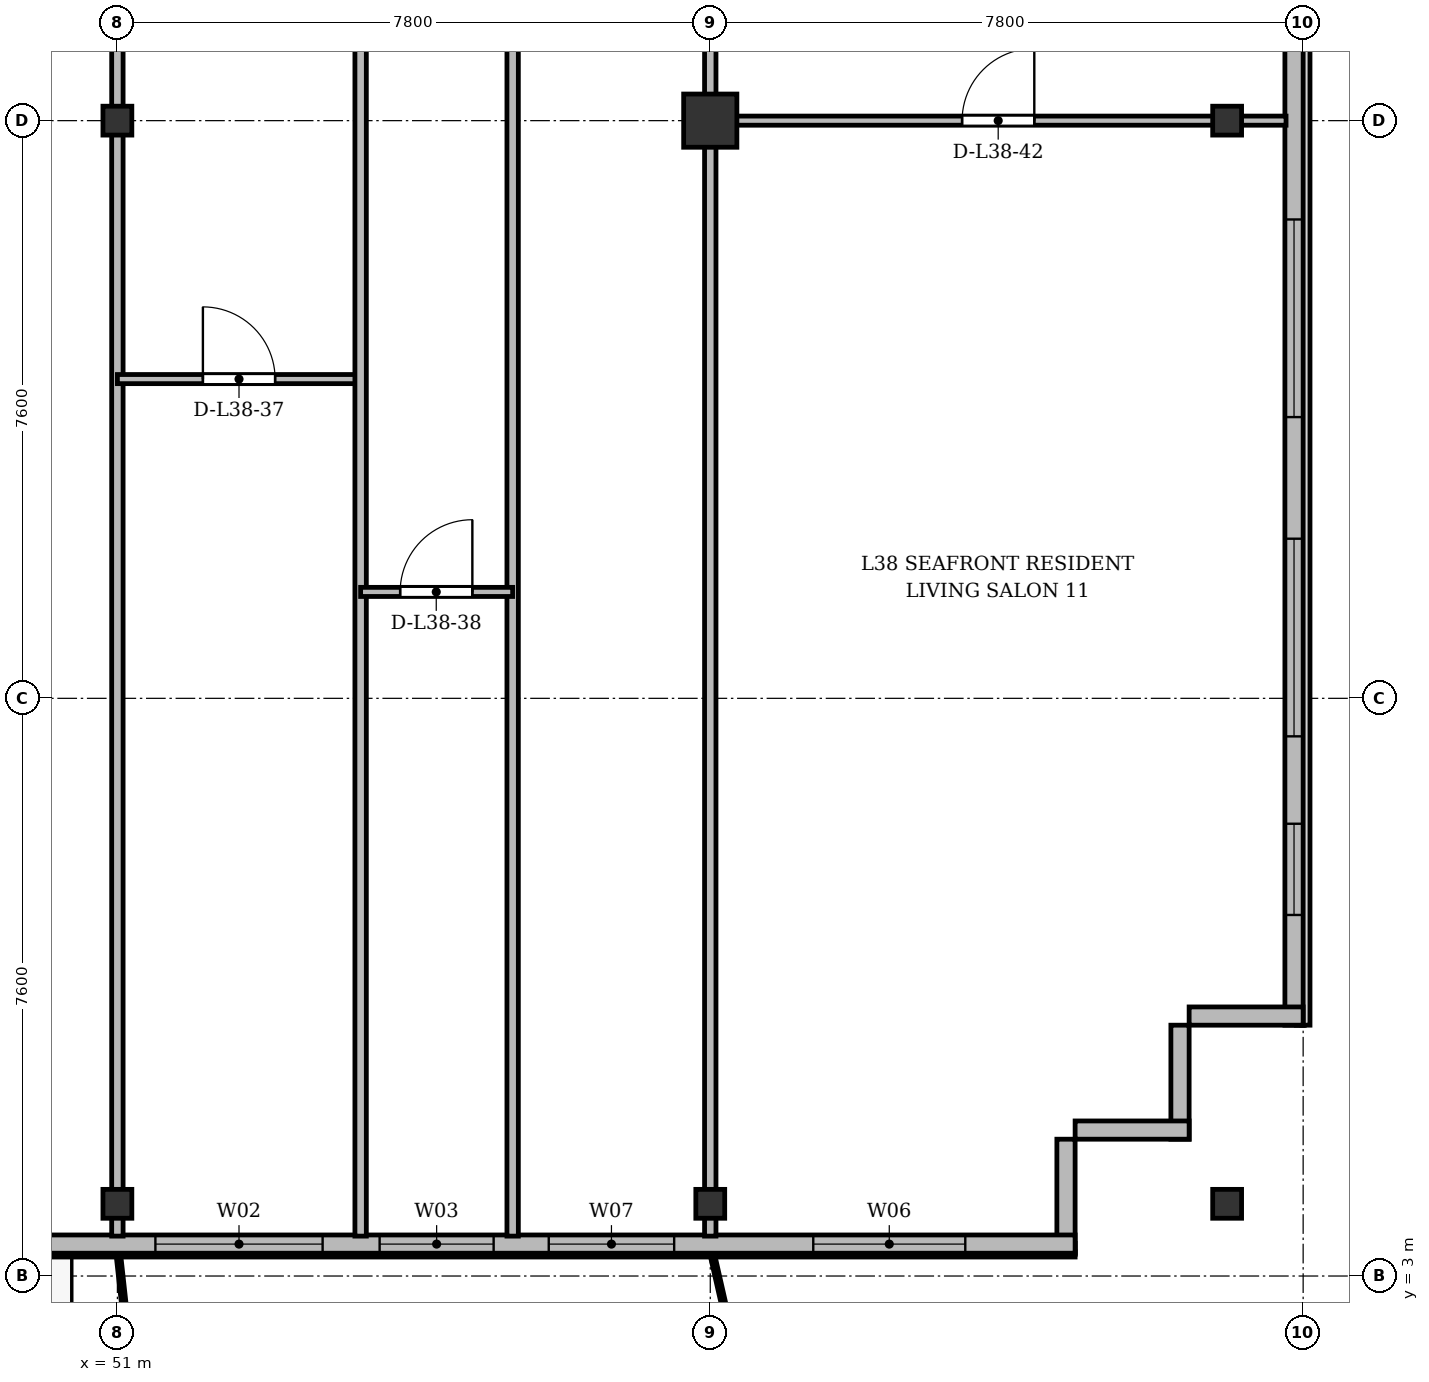
"""IFC4 building model, lengths in metres.
Left out: names, types, materials, properties, quantities, classifications, styles, units other than length and angle.
Written with IfcOpenShell. Run it as: python <this file> out.ifc"""

import sys

from ifc_helpers import new_model, si_unit, direction, frame, frame_2d, origin, origin_2d, place, context, subcontext, project, spatial, rectangle, i_section, extrude, source, transform, mapped, element, fill, save


model = new_model("IFC4")
c1 = context("Model", 3, precision=1e-05, world=origin(), true_north=direction((0.0, 1.0)))
c2 = subcontext(c1, "Body", "Model", "MODEL_VIEW")
j1 = project(units=[si_unit("LENGTHUNIT", "METRE"), si_unit("PLANEANGLEUNIT", "RADIAN")], contexts=[c1])
p1 = place(None, origin())
s1 = spatial("IfcSite", under=j1, at=p1, CompositionType="ELEMENT")
p2 = place(p1, origin())
s2 = spatial("IfcBuilding", under=s1, at=p2, CompositionType="ELEMENT")
p3 = place(p2, frame((0.0, 0.0, 146.5)))
s3 = spatial("IfcBuildingStorey", under=s2, at=p3, CompositionType="ELEMENT", Elevation=146.5)
m1 = source(origin(), c2, "Body", "SweptSolid", [
    extrude(i_section(OverallWidth=0.38, OverallDepth=0.38, WebThickness=0.02, FlangeThickness=0.03, at=origin_2d()), origin(), (0.0, 0.0, 1.0), 3.6),
])
for number, where, z_axis, x_axis in (
    (1, (51.0, 3.95, 0.0), (0.0, 0.0, 1.0), (1.0, 0.0, 0.0)),
    (2, (51.0, 18.2, 0.0), (0.0, 0.0, 1.0), (1.0, 0.0, 0.0)),
    (3, (58.8, 3.95, 0.0), (0.0, 0.0, 1.0), (1.0, 0.0, 0.0)),
):
    element("IfcColumn", number, at=place(p3, frame(where, z_axis=z_axis, x_axis=x_axis)), inside=s3, PredefinedType="COLUMN", context=c2, shape_type="MappedRepresentation", body=[
        mapped(m1, transform((0.0, 0.0, 0.0), x_axis=(1.0, 0.0, 0.0), y_axis=(0.0, 1.0, 0.0), z_axis=(0.0, 0.0, 1.0), scale=1.0)),
    ])
m2 = source(origin(), c2, "Body", "SweptSolid", [
    extrude(rectangle(XDim=0.7, YDim=0.7, at=origin_2d()), origin(), (0.0, 0.0, 1.0), 3.6),
])
p4 = place(p3, frame((58.8, 18.2, 0.0), z_axis=(0.0, 0.0, 1.0), x_axis=(1.0, 0.0, 0.0)))
e4 = element("IfcColumn", 4, at=p4, inside=s3, PredefinedType="COLUMN", context=c2, shape_type="MappedRepresentation", body=[
    mapped(m2, transform((0.0, 0.0, 0.0), x_axis=(1.0, 0.0, 0.0), y_axis=(0.0, 1.0, 0.0), z_axis=(0.0, 0.0, 1.0), scale=1.0)),
])
for number, where, z_axis, x_axis in (
    (5, (65.6, 3.95, 0.0), (0.0, 0.0, 1.0), (1.0, 0.0, 0.0)),
    (6, (65.6, 18.2, 0.0), (0.0, 0.0, 1.0), (1.0, 0.0, 0.0)),
):
    element("IfcColumn", number, at=place(p3, frame(where, z_axis=z_axis, x_axis=x_axis)), inside=s3, PredefinedType="COLUMN", context=c2, shape_type="MappedRepresentation", body=[
        mapped(m1, transform((0.0, 0.0, 0.0), x_axis=(1.0, 0.0, 0.0), y_axis=(0.0, 1.0, 0.0), z_axis=(0.0, 0.0, 1.0), scale=1.0)),
    ])
p5 = place(p3, frame((66.48, 45.5, 0.0), z_axis=(0.0, 0.0, 1.0), x_axis=(0.0, -1.0, 0.0)))
e7 = element("IfcWall", 7, at=p5, inside=s3, PredefinedType="SOLIDWALL", context=c2, shape_type="SweptSolid", body=[
    extrude(rectangle(XDim=39.2, YDim=0.24, at=frame_2d((19.6, 0.0))), origin(), (0.0, 0.0, 1.0), 3.35),
])
p6 = place(p5, frame((36.55, 0.0, 0.92)))
e8 = element("IfcOpeningElement", 8, at=p6, cuts=e7, PredefinedType="OPENING", context=c2, shape_type="SweptSolid", body=[
    extrude(rectangle(XDim=1.2, YDim=1.65, at=frame_2d((0.6, 0.825))), frame((0.0, 0.13, 0.0), z_axis=(0.0, -1.0, 0.0), x_axis=(1.0, 0.0, 0.0)), (0.0, 0.0, 1.0), 0.26),
])
p7 = place(p5, frame((32.8, 0.0, 0.92)))
e9 = element("IfcOpeningElement", 9, at=p7, cuts=e7, PredefinedType="OPENING", context=c2, shape_type="SweptSolid", body=[
    extrude(rectangle(XDim=2.6, YDim=1.9, at=frame_2d((1.3, 0.95))), frame((0.0, 0.13, 0.0), z_axis=(0.0, -1.0, 0.0), x_axis=(1.0, 0.0, 0.0)), (0.0, 0.0, 1.0), 0.26),
])
p8 = place(p5, frame((28.6, 0.0, 0.92)))
e10 = element("IfcOpeningElement", 10, at=p8, cuts=e7, PredefinedType="OPENING", context=c2, shape_type="SweptSolid", body=[
    extrude(rectangle(XDim=2.6, YDim=1.9, at=frame_2d((1.3, 0.95))), frame((0.0, 0.13, 0.0), z_axis=(0.0, -1.0, 0.0), x_axis=(1.0, 0.0, 0.0)), (0.0, 0.0, 1.0), 0.26),
])
p9 = place(p5, frame((21.4, 0.0, 0.92)))
e11 = element("IfcOpeningElement", 11, at=p9, cuts=e7, PredefinedType="OPENING", context=c2, shape_type="SweptSolid", body=[
    extrude(rectangle(XDim=2.6, YDim=1.9, at=frame_2d((1.3, 0.95))), frame((0.0, 0.13, 0.0), z_axis=(0.0, -1.0, 0.0), x_axis=(1.0, 0.0, 0.0)), (0.0, 0.0, 1.0), 0.26),
])
p10 = place(p5, frame((7.4, 0.0, 0.92)))
e12 = element("IfcOpeningElement", 12, at=p10, cuts=e7, PredefinedType="OPENING", context=c2, shape_type="SweptSolid", body=[
    extrude(rectangle(XDim=2.6, YDim=1.9, at=frame_2d((1.3, 0.95))), frame((0.0, 0.13, 0.0), z_axis=(0.0, -1.0, 0.0), x_axis=(1.0, 0.0, 0.0)), (0.0, 0.0, 1.0), 0.26),
])
p11 = place(p5, frame((4.5, 0.0, 0.92)))
e13 = element("IfcOpeningElement", 13, at=p11, cuts=e7, PredefinedType="OPENING", context=c2, shape_type="SweptSolid", body=[
    extrude(rectangle(XDim=1.2, YDim=1.65, at=frame_2d((0.6, 0.825))), frame((0.0, 0.13, 0.0), z_axis=(0.0, -1.0, 0.0), x_axis=(1.0, 0.0, 0.0)), (0.0, 0.0, 1.0), 0.26),
])
p12 = place(p5, frame((1.15, 0.0, 0.92)))
e14 = element("IfcOpeningElement", 14, at=p12, cuts=e7, PredefinedType="OPENING", context=c2, shape_type="SweptSolid", body=[
    extrude(rectangle(XDim=1.2, YDim=1.65, at=frame_2d((0.6, 0.825))), frame((0.0, 0.13, 0.0), z_axis=(0.0, -1.0, 0.0), x_axis=(1.0, 0.0, 0.0)), (0.0, 0.0, 1.0), 0.26),
])
p13 = place(p3, frame((66.6, 6.42, 0.0), z_axis=(0.0, 0.0, 1.0), x_axis=(-1.0, 0.0, 0.0)))
e15 = element("IfcWall", 15, at=p13, inside=s3, PredefinedType="SOLIDWALL", context=c2, shape_type="SweptSolid", body=[
    extrude(rectangle(XDim=1.5, YDim=0.24, at=frame_2d((0.75, 0.0))), origin(), (0.0, 0.0, 1.0), 2.85),
])
for number, where, z_axis, x_axis in (
    (16, (64.98, 6.3, 0.0), (0.0, 0.0, 1.0), (0.0, -1.0, 0.0)),
    (17, (65.1, 4.92, 0.0), (0.0, 0.0, 1.0), (-1.0, 0.0, 0.0)),
):
    element("IfcWall", number, at=place(p3, frame(where, z_axis=z_axis, x_axis=x_axis)), inside=s3, PredefinedType="SOLIDWALL", context=c2, shape_type="SweptSolid", body=[
        extrude(rectangle(XDim=1.5, YDim=0.24, at=frame_2d((0.75, 0.0))), origin(), (0.0, 0.0, 1.0), 3.35),
    ])
p14 = place(p3, frame((63.48, 4.8, 0.0), z_axis=(0.0, 0.0, 1.0), x_axis=(0.0, -1.0, 0.0)))
e18 = element("IfcWall", 18, at=p14, inside=s3, PredefinedType="SOLIDWALL", context=c2, shape_type="SweptSolid", body=[
    extrude(rectangle(XDim=1.5, YDim=0.24, at=frame_2d((0.75, 0.0))), origin(), (0.0, 0.0, 1.0), 2.75),
])
p15 = place(p3, frame((63.6, 3.42, 0.0), z_axis=(0.0, 0.0, 1.0), x_axis=(-1.0, 0.0, 0.0)))
e19 = element("IfcWall", 19, at=p15, inside=s3, PredefinedType="SOLIDWALL", context=c2, shape_type="SweptSolid", body=[
    extrude(rectangle(XDim=52.8, YDim=0.24, at=frame_2d((26.4, 0.0))), origin(), (0.0, 0.0, 1.0), 3.35),
])
p16 = place(p15, frame((1.445, 0.0, 0.9)))
e20 = element("IfcOpeningElement", 20, at=p16, cuts=e19, PredefinedType="OPENING", context=c2, shape_type="SweptSolid", body=[
    extrude(rectangle(XDim=2.0, YDim=1.95, at=frame_2d((1.0, 0.975))), frame((0.0, 0.13, 0.0), z_axis=(0.0, -1.0, 0.0), x_axis=(1.0, 0.0, 0.0)), (0.0, 0.0, 1.0), 0.26),
])
p17 = place(p15, frame((5.275, 0.0, 0.9)))
e21 = element("IfcOpeningElement", 21, at=p17, cuts=e19, PredefinedType="OPENING", context=c2, shape_type="SweptSolid", body=[
    extrude(rectangle(XDim=1.65, YDim=1.85, at=frame_2d((0.825, 0.925))), frame((0.0, 0.13, 0.0), z_axis=(0.0, -1.0, 0.0), x_axis=(1.0, 0.0, 0.0)), (0.0, 0.0, 1.0), 0.26),
])
p18 = place(p15, frame((7.65, 0.0, 0.9)))
e22 = element("IfcOpeningElement", 22, at=p18, cuts=e19, PredefinedType="OPENING", context=c2, shape_type="SweptSolid", body=[
    extrude(rectangle(XDim=1.5, YDim=1.75, at=frame_2d((0.75, 0.875))), frame((0.0, 0.13, 0.0), z_axis=(0.0, -1.0, 0.0), x_axis=(1.0, 0.0, 0.0)), (0.0, 0.0, 1.0), 0.26),
])
p19 = place(p15, frame((9.9, 0.0, 0.9)))
e23 = element("IfcOpeningElement", 23, at=p19, cuts=e19, PredefinedType="OPENING", context=c2, shape_type="SweptSolid", body=[
    extrude(rectangle(XDim=2.2, YDim=1.8, at=frame_2d((1.1, 0.9))), frame((0.0, 0.13, 0.0), z_axis=(0.0, -1.0, 0.0), x_axis=(1.0, 0.0, 0.0)), (0.0, 0.0, 1.0), 0.26),
])
p20 = place(p15, frame((14.417, 0.0, 0.0)))
e24 = element("IfcOpeningElement", 24, at=p20, cuts=e19, PredefinedType="OPENING", context=c2, shape_type="SweptSolid", body=[
    extrude(rectangle(XDim=1.2, YDim=2.2, at=frame_2d((0.6, 1.1))), frame((0.0, 0.13, 0.0), z_axis=(0.0, -1.0, 0.0), x_axis=(1.0, 0.0, 0.0)), (0.0, 0.0, 1.0), 0.26),
])
p21 = place(p15, frame((25.4, 0.0, 0.9)))
e25 = element("IfcOpeningElement", 25, at=p21, cuts=e19, PredefinedType="OPENING", context=c2, shape_type="SweptSolid", body=[
    extrude(rectangle(XDim=2.0, YDim=1.95, at=frame_2d((1.0, 0.975))), frame((0.0, 0.13, 0.0), z_axis=(0.0, -1.0, 0.0), x_axis=(1.0, 0.0, 0.0)), (0.0, 0.0, 1.0), 0.26),
])
p22 = place(p15, frame((35.775, 0.0, 0.9)))
e26 = element("IfcOpeningElement", 26, at=p22, cuts=e19, PredefinedType="OPENING", context=c2, shape_type="SweptSolid", body=[
    extrude(rectangle(XDim=1.65, YDim=1.85, at=frame_2d((0.825, 0.925))), frame((0.0, 0.13, 0.0), z_axis=(0.0, -1.0, 0.0), x_axis=(1.0, 0.0, 0.0)), (0.0, 0.0, 1.0), 0.26),
])
p23 = place(p15, frame((41.656, 0.0, 0.0)))
e27 = element("IfcOpeningElement", 27, at=p23, cuts=e19, PredefinedType="OPENING", context=c2, shape_type="SweptSolid", body=[
    extrude(rectangle(XDim=1.2, YDim=2.2, at=frame_2d((0.6, 1.1))), frame((0.0, 0.13, 0.0), z_axis=(0.0, -1.0, 0.0), x_axis=(1.0, 0.0, 0.0)), (0.0, 0.0, 1.0), 0.26),
])
p24 = place(p15, frame((43.65, 0.0, 0.9)))
e28 = element("IfcOpeningElement", 28, at=p24, cuts=e19, PredefinedType="OPENING", context=c2, shape_type="SweptSolid", body=[
    extrude(rectangle(XDim=1.5, YDim=1.75, at=frame_2d((0.75, 0.875))), frame((0.0, 0.13, 0.0), z_axis=(0.0, -1.0, 0.0), x_axis=(1.0, 0.0, 0.0)), (0.0, 0.0, 1.0), 0.26),
])
p25 = place(p15, frame((45.95, 0.0, 0.9)))
e29 = element("IfcOpeningElement", 29, at=p25, cuts=e19, PredefinedType="OPENING", context=c2, shape_type="SweptSolid", body=[
    extrude(rectangle(XDim=1.5, YDim=1.75, at=frame_2d((0.75, 0.875))), frame((0.0, 0.13, 0.0), z_axis=(0.0, -1.0, 0.0), x_axis=(1.0, 0.0, 0.0)), (0.0, 0.0, 1.0), 0.26),
])
p26 = place(p15, frame((49.355, 0.0, 0.9)))
e30 = element("IfcOpeningElement", 30, at=p26, cuts=e19, PredefinedType="OPENING", context=c2, shape_type="SweptSolid", body=[
    extrude(rectangle(XDim=2.0, YDim=1.95, at=frame_2d((1.0, 0.975))), frame((0.0, 0.13, 0.0), z_axis=(0.0, -1.0, 0.0), x_axis=(1.0, 0.0, 0.0)), (0.0, 0.0, 1.0), 0.26),
])
for number, where, z_axis, x_axis in (
    (31, (51.0, 3.525, 0.0), (0.0, 0.0, 1.0), (0.0, 1.0, 0.0)),
    (32, (58.8, 3.525, 0.0), (0.0, 0.0, 1.0), (0.0, 1.0, 0.0)),
):
    element("IfcWall", number, at=place(p3, frame(where, z_axis=z_axis, x_axis=x_axis)), inside=s3, PredefinedType="PARTITIONING", context=c2, shape_type="SweptSolid", body=[
        extrude(rectangle(XDim=27.275, YDim=0.15, at=frame_2d((13.638, 0.0))), origin(), (0.0, 0.0, 1.0), 2.85),
    ])
p27 = place(p3, frame((51.0, 14.8, 0.0), z_axis=(0.0, 0.0, 1.0), x_axis=(1.0, 0.0, 0.0)))
e33 = element("IfcWall", 33, at=p27, inside=s3, PredefinedType="PARTITIONING", context=c2, shape_type="SweptSolid", body=[
    extrude(rectangle(XDim=3.2, YDim=0.12, at=frame_2d((1.6, 0.0))), origin(), (0.0, 0.0, 1.0), 2.85),
])
p28 = place(p27, frame((1.125, 0.0, 0.0)))
e34 = element("IfcOpeningElement", 34, at=p28, cuts=e33, PredefinedType="OPENING", context=c2, shape_type="SweptSolid", body=[
    extrude(rectangle(XDim=0.95, YDim=2.15, at=frame_2d((0.475, 1.075))), frame((0.0, 0.07, 0.0), z_axis=(0.0, -1.0, 0.0), x_axis=(1.0, 0.0, 0.0)), (0.0, 0.0, 1.0), 0.14),
])
for number, where, z_axis, x_axis in (
    (35, (54.2, 3.525, 0.0), (0.0, 0.0, 1.0), (0.0, 1.0, 0.0)),
    (36, (56.2, 3.525, 0.0), (0.0, 0.0, 1.0), (0.0, 1.0, 0.0)),
):
    element("IfcWall", number, at=place(p3, frame(where, z_axis=z_axis, x_axis=x_axis)), inside=s3, PredefinedType="PARTITIONING", context=c2, shape_type="SweptSolid", body=[
        extrude(rectangle(XDim=27.275, YDim=0.15, at=frame_2d((13.638, 0.0))), origin(), (0.0, 0.0, 1.0), 2.75),
    ])
p29 = place(p3, frame((54.2, 12.0, 0.0), z_axis=(0.0, 0.0, 1.0), x_axis=(1.0, 0.0, 0.0)))
e37 = element("IfcWall", 37, at=p29, inside=s3, PredefinedType="PARTITIONING", context=c2, shape_type="SweptSolid", body=[
    extrude(rectangle(XDim=2.0, YDim=0.12, at=frame_2d((1.0, 0.0))), origin(), (0.0, 0.0, 1.0), 3.35),
])
p30 = place(p29, frame((0.52, 0.0, 0.0)))
e38 = element("IfcOpeningElement", 38, at=p30, cuts=e37, PredefinedType="OPENING", context=c2, shape_type="SweptSolid", body=[
    extrude(rectangle(XDim=0.95, YDim=2.15, at=frame_2d((0.475, 1.075))), frame((0.0, 0.07, 0.0), z_axis=(0.0, -1.0, 0.0), x_axis=(1.0, 0.0, 0.0)), (0.0, 0.0, 1.0), 0.14),
])
p31 = place(p3, frame((58.8, 18.2, 0.0), z_axis=(0.0, 0.0, 1.0), x_axis=(1.0, 0.0, 0.0)))
e39 = element("IfcWall", 39, at=p31, inside=s3, PredefinedType="PARTITIONING", context=c2, shape_type="SweptSolid", body=[
    extrude(rectangle(XDim=7.575, YDim=0.12, at=frame_2d((3.788, 0.0))), origin(), (0.0, 0.0, 1.0), 2.75),
])
p32 = place(p31, frame((3.313, 0.0, 0.0)))
e40 = element("IfcOpeningElement", 40, at=p32, cuts=e39, PredefinedType="OPENING", context=c2, shape_type="SweptSolid", body=[
    extrude(rectangle(XDim=0.95, YDim=2.15, at=frame_2d((0.475, 1.075))), frame((0.0, 0.07, 0.0), z_axis=(0.0, -1.0, 0.0), x_axis=(1.0, 0.0, 0.0)), (0.0, 0.0, 1.0), 0.14),
])
m3 = source(origin(), c2, "Body", "SweptSolid", [
    extrude(rectangle(XDim=1.2, YDim=1.65, at=frame_2d((0.6, 0.825))), frame((0.0, 0.03, 0.0), z_axis=(0.0, -1.0, 0.0), x_axis=(1.0, 0.0, 0.0)), (0.0, 0.0, 1.0), 0.06),
])
p33 = place(p6, origin())
e41 = element("IfcWindow", 41, at=p33, inside=s3, PartitioningType="SINGLE_PANEL", PredefinedType="WINDOW", context=c2, shape_type="MappedRepresentation", body=[
    mapped(m3, transform((0.0, 0.0, 0.0), x_axis=(1.0, 0.0, 0.0), y_axis=(0.0, 1.0, 0.0), z_axis=(0.0, 0.0, 1.0), scale=1.0)),
])
fill(e8, e41)
m4 = source(origin(), c2, "Body", "SweptSolid", [
    extrude(rectangle(XDim=2.6, YDim=1.9, at=frame_2d((1.3, 0.95))), frame((0.0, 0.03, 0.0), z_axis=(0.0, -1.0, 0.0), x_axis=(1.0, 0.0, 0.0)), (0.0, 0.0, 1.0), 0.06),
])
p34 = place(p7, origin())
e42 = element("IfcWindow", 42, at=p34, inside=s3, PartitioningType="SINGLE_PANEL", PredefinedType="WINDOW", context=c2, shape_type="MappedRepresentation", body=[
    mapped(m4, transform((0.0, 0.0, 0.0), x_axis=(1.0, 0.0, 0.0), y_axis=(0.0, 1.0, 0.0), z_axis=(0.0, 0.0, 1.0), scale=1.0)),
])
fill(e9, e42)
p35 = place(p8, origin())
e43 = element("IfcWindow", 43, at=p35, inside=s3, PartitioningType="SINGLE_PANEL", PredefinedType="WINDOW", context=c2, shape_type="MappedRepresentation", body=[
    mapped(m4, transform((0.0, 0.0, 0.0), x_axis=(1.0, 0.0, 0.0), y_axis=(0.0, 1.0, 0.0), z_axis=(0.0, 0.0, 1.0), scale=1.0)),
])
fill(e10, e43)
m5 = source(origin(), c2, "Body", "SweptSolid", [
    extrude(rectangle(XDim=2.0, YDim=1.95, at=frame_2d((1.0, 0.975))), frame((0.0, 0.03, 0.0), z_axis=(0.0, -1.0, 0.0), x_axis=(1.0, 0.0, 0.0)), (0.0, 0.0, 1.0), 0.06),
])
p36 = place(p16, origin())
e44 = element("IfcWindow", 44, at=p36, inside=s3, PartitioningType="SINGLE_PANEL", PredefinedType="WINDOW", context=c2, shape_type="MappedRepresentation", body=[
    mapped(m5, transform((0.0, 0.0, 0.0), x_axis=(1.0, 0.0, 0.0), y_axis=(0.0, 1.0, 0.0), z_axis=(0.0, 0.0, 1.0), scale=1.0)),
])
fill(e20, e44)
m6 = source(origin(), c2, "Body", "SweptSolid", [
    extrude(rectangle(XDim=1.65, YDim=1.85, at=frame_2d((0.825, 0.925))), frame((0.0, 0.03, 0.0), z_axis=(0.0, -1.0, 0.0), x_axis=(1.0, 0.0, 0.0)), (0.0, 0.0, 1.0), 0.06),
])
p37 = place(p17, origin())
e45 = element("IfcWindow", 45, at=p37, inside=s3, PartitioningType="SINGLE_PANEL", PredefinedType="WINDOW", context=c2, shape_type="MappedRepresentation", body=[
    mapped(m6, transform((0.0, 0.0, 0.0), x_axis=(1.0, 0.0, 0.0), y_axis=(0.0, 1.0, 0.0), z_axis=(0.0, 0.0, 1.0), scale=1.0)),
])
fill(e21, e45)
m7 = source(origin(), c2, "Body", "SweptSolid", [
    extrude(rectangle(XDim=1.5, YDim=1.75, at=frame_2d((0.75, 0.875))), frame((0.0, 0.03, 0.0), z_axis=(0.0, -1.0, 0.0), x_axis=(1.0, 0.0, 0.0)), (0.0, 0.0, 1.0), 0.06),
])
p38 = place(p18, origin())
e46 = element("IfcWindow", 46, at=p38, inside=s3, PartitioningType="SINGLE_PANEL", PredefinedType="WINDOW", context=c2, shape_type="MappedRepresentation", body=[
    mapped(m7, transform((0.0, 0.0, 0.0), x_axis=(1.0, 0.0, 0.0), y_axis=(0.0, 1.0, 0.0), z_axis=(0.0, 0.0, 1.0), scale=1.0)),
])
fill(e22, e46)
m8 = source(origin(), c2, "Body", "SweptSolid", [
    extrude(rectangle(XDim=2.2, YDim=1.8, at=frame_2d((1.1, 0.9))), frame((0.0, 0.03, 0.0), z_axis=(0.0, -1.0, 0.0), x_axis=(1.0, 0.0, 0.0)), (0.0, 0.0, 1.0), 0.06),
])
p39 = place(p19, origin())
e47 = element("IfcWindow", 47, at=p39, inside=s3, PartitioningType="SINGLE_PANEL", PredefinedType="WINDOW", context=c2, shape_type="MappedRepresentation", body=[
    mapped(m8, transform((0.0, 0.0, 0.0), x_axis=(1.0, 0.0, 0.0), y_axis=(0.0, 1.0, 0.0), z_axis=(0.0, 0.0, 1.0), scale=1.0)),
])
fill(e23, e47)
m9 = source(origin(), c2, "Body", "SweptSolid", [
    extrude(rectangle(XDim=0.95, YDim=2.15, at=frame_2d((0.475, 1.075))), frame((0.0, 0.025, 0.0), z_axis=(0.0, -1.0, 0.0), x_axis=(1.0, 0.0, 0.0)), (0.0, 0.0, 1.0), 0.05),
])
p40 = place(p28, origin())
e48 = element("IfcDoor", 48, at=p40, inside=s3, OperationType="SINGLE_SWING_LEFT", PredefinedType="DOOR", context=c2, shape_type="MappedRepresentation", body=[
    mapped(m9, transform((0.0, 0.0, 0.0), x_axis=(1.0, 0.0, 0.0), y_axis=(0.0, 1.0, 0.0), z_axis=(0.0, 0.0, 1.0), scale=1.0)),
])
fill(e34, e48)
p41 = place(p30, origin())
e49 = element("IfcDoor", 49, at=p41, inside=s3, OperationType="SINGLE_SWING_RIGHT", PredefinedType="DOOR", context=c2, shape_type="MappedRepresentation", body=[
    mapped(m9, transform((0.0, 0.0, 0.0), x_axis=(1.0, 0.0, 0.0), y_axis=(0.0, 1.0, 0.0), z_axis=(0.0, 0.0, 1.0), scale=1.0)),
])
fill(e38, e49)
p42 = place(p32, origin())
e50 = element("IfcDoor", 50, at=p42, inside=s3, OperationType="SINGLE_SWING_RIGHT", PredefinedType="DOOR", context=c2, shape_type="MappedRepresentation", body=[
    mapped(m9, transform((0.0, 0.0, 0.0), x_axis=(1.0, 0.0, 0.0), y_axis=(0.0, 1.0, 0.0), z_axis=(0.0, 0.0, 1.0), scale=1.0)),
])
fill(e40, e50)
save(model, sys.argv[1])
